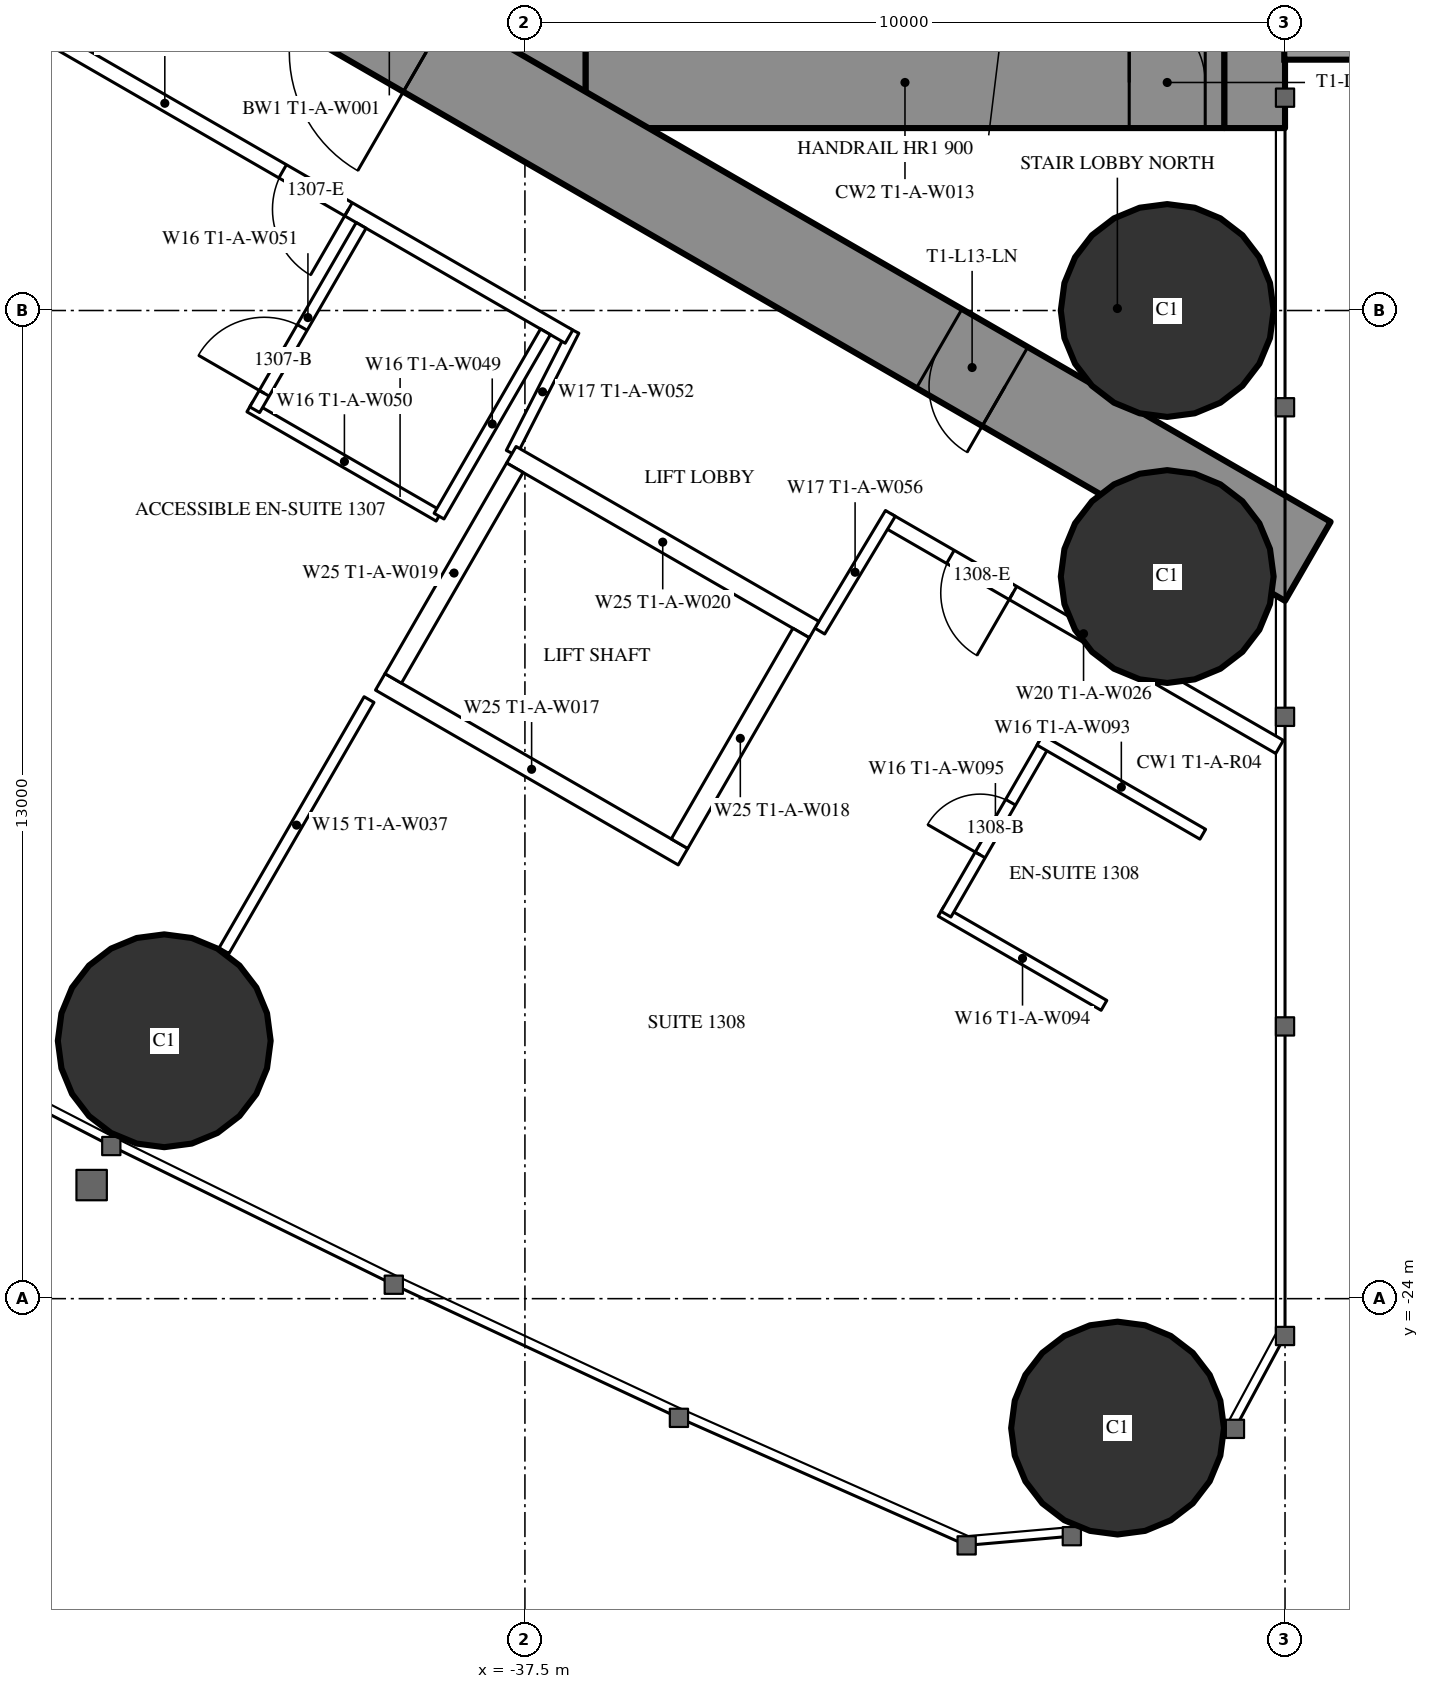
"""IFC4 building model, lengths in metres.
Left out: names, types, materials, properties, quantities, classifications, styles, units other than length and angle.
Written with IfcOpenShell. Run it as: python <this file> out.ifc"""

import sys

from ifc_helpers import new_model, si_unit, direction, frame, frame_2d, origin, origin_2d, place, context, subcontext, project, spatial, rectangle, hollow_circle, extrude, element, fill, save


model = new_model("IFC4")
c1 = context("Model", 3, precision=1e-05, world=origin(), true_north=direction((0.0, 1.0)))
c2 = subcontext(c1, "Body", "Model", "MODEL_VIEW")
j1 = project(units=[si_unit("LENGTHUNIT", "METRE"), si_unit("PLANEANGLEUNIT", "RADIAN")], contexts=[c1])
p1 = place(None, origin())
s1 = spatial("IfcSite", under=j1, at=p1, CompositionType="ELEMENT")
p2 = place(p1, origin())
s2 = spatial("IfcBuilding", under=s1, at=p2, CompositionType="ELEMENT")
p3 = place(p2, frame((0.0, 0.0, 53.0)))
s3 = spatial("IfcBuildingStorey", under=s2, at=p3, CompositionType="ELEMENT", Elevation=53.0)
for number, where, z_axis, x_axis in (
    (1, (-29.703, -25.703, 0.0), (0.0, 0.0, 1.0), (1.0, 0.0, 0.0)),
    (2, (-29.05, -11.0, 0.0), (0.0, 0.0, 1.0), (1.0, 0.0, 0.0)),
    (3, (-29.05, -14.5, 0.0), (0.0, 0.0, 1.0), (1.0, 0.0, 0.0)),
    (4, (-42.245, -20.607, 0.0), (0.0, 0.0, 1.0), (1.0, 0.0, 0.0)),
):
    element("IfcColumn", number, at=place(p3, frame(where, z_axis=z_axis, x_axis=x_axis)), inside=s3, PredefinedType="COLUMN", context=c2, shape_type="SweptSolid", body=[
        extrude(hollow_circle(Radius=1.4, WallThickness=0.12, at=origin_2d()), origin(), (0.0, 0.0, 1.0), 3.5),
    ])
p4 = place(p3, frame((-27.9, 8.6, 0.0), z_axis=(0.0, 0.0, 1.0), x_axis=(0.0, -1.0, 0.0)))
e5 = element("IfcWall", 5, at=p4, inside=s3, PredefinedType="SHEAR", context=c2, shape_type="SweptSolid", body=[
    extrude(rectangle(XDim=17.2, YDim=0.8, at=frame_2d((8.6, 0.0))), origin(), (0.0, 0.0, 1.0), 3.5),
])
p5 = place(p4, frame((2.45, 0.0, 0.6)))
e6 = element("IfcOpeningElement", 6, at=p5, cuts=e5, PredefinedType="OPENING", context=c2, shape_type="SweptSolid", body=[
    extrude(rectangle(XDim=0.6, YDim=2.1, at=frame_2d((0.3, 1.05))), frame((0.0, 0.41, 0.0), z_axis=(0.0, -1.0, 0.0), x_axis=(1.0, 0.0, 0.0)), (0.0, 0.0, 1.0), 0.82),
])
p6 = place(p4, frame((14.15, 0.0, 0.6)))
e7 = element("IfcOpeningElement", 7, at=p6, cuts=e5, PredefinedType="OPENING", context=c2, shape_type="SweptSolid", body=[
    extrude(rectangle(XDim=0.6, YDim=2.1, at=frame_2d((0.3, 1.05))), frame((0.0, 0.41, 0.0), z_axis=(0.0, -1.0, 0.0), x_axis=(1.0, 0.0, 0.0)), (0.0, 0.0, 1.0), 0.82),
])
p7 = place(p3, frame((-37.3, 8.6, 0.0), z_axis=(0.0, 0.0, 1.0), x_axis=(0.0, -1.0, 0.0)))
e8 = element("IfcWall", 8, at=p7, inside=s3, PredefinedType="SHEAR", context=c2, shape_type="SweptSolid", body=[
    extrude(rectangle(XDim=17.2, YDim=1.2, at=frame_2d((8.6, 0.0))), origin(), (0.0, 0.0, 1.0), 3.5),
])
p8 = place(p7, frame((7.7, 0.0, 0.0)))
e9 = element("IfcOpeningElement", 9, at=p8, cuts=e8, PredefinedType="OPENING", context=c2, shape_type="SweptSolid", body=[
    extrude(rectangle(XDim=1.8, YDim=2.2, at=frame_2d((0.9, 1.1))), frame((0.0, 0.61, 0.0), z_axis=(0.0, -1.0, 0.0), x_axis=(1.0, 0.0, 0.0)), (0.0, 0.0, 1.0), 1.22),
])
p9 = place(p3, frame((-28.3, -8.0, 0.0), z_axis=(0.0, 0.0, 1.0), x_axis=(-1.0, 0.0, 0.0)))
e10 = element("IfcWall", 10, at=p9, inside=s3, PredefinedType="SHEAR", context=c2, shape_type="SweptSolid", body=[
    extrude(rectangle(XDim=8.4, YDim=1.2, at=frame_2d((4.2, 0.0))), origin(), (0.0, 0.0, 1.0), 3.5),
])
p10 = place(p9, frame((0.25, 0.0, 0.0)))
e11 = element("IfcOpeningElement", 11, at=p10, cuts=e10, PredefinedType="OPENING", context=c2, shape_type="SweptSolid", body=[
    extrude(rectangle(XDim=1.0, YDim=2.2, at=frame_2d((0.5, 1.1))), frame((0.0, 0.61, 0.0), z_axis=(0.0, -1.0, 0.0), x_axis=(1.0, 0.0, 0.0)), (0.0, 0.0, 1.0), 1.22),
])
p11 = place(p3, frame((-27.2, -14.3, 0.0), z_axis=(0.0, 0.0, 1.0), x_axis=(-0.866024021859, 0.500002393557, 0.0)))
e12 = element("IfcWall", 12, at=p11, inside=s3, PredefinedType="SHEAR", context=c2, shape_type="SweptSolid", body=[
    extrude(rectangle(XDim=27.907, YDim=1.2, at=frame_2d((13.954, 0.0))), origin(), (0.0, 0.0, 1.0), 3.5),
])
p12 = place(p11, frame((4.6, 0.0, 0.0)))
e13 = element("IfcOpeningElement", 13, at=p12, cuts=e12, PredefinedType="OPENING", context=c2, shape_type="SweptSolid", body=[
    extrude(rectangle(XDim=1.0, YDim=2.2, at=frame_2d((0.5, 1.1))), frame((0.0, 0.61, 0.0), z_axis=(0.0, -1.0, 0.0), x_axis=(1.0, 0.0, 0.0)), (0.0, 0.0, 1.0), 1.22),
])
p13 = place(p11, frame((13.395, 0.0, 0.0)))
e14 = element("IfcOpeningElement", 14, at=p13, cuts=e12, PredefinedType="OPENING", context=c2, shape_type="SweptSolid", body=[
    extrude(rectangle(XDim=1.8, YDim=2.2, at=frame_2d((0.9, 1.1))), frame((0.0, 0.61, 0.0), z_axis=(0.0, -1.0, 0.0), x_axis=(1.0, 0.0, 0.0)), (0.0, 0.0, 1.0), 1.22),
])
p14 = place(p3, frame((-39.551, -16.118, 0.0), z_axis=(0.0, 0.0, 1.0), x_axis=(-0.499986503906, -0.866033195618, 0.0)))
e15 = element("IfcWall", 15, at=p14, inside=s3, PredefinedType="PARTITIONING", context=c2, shape_type="SweptSolid", body=[
    extrude(rectangle(XDim=3.815, YDim=0.15, at=frame_2d((1.907, 0.0))), origin(), (0.0, 0.0, 1.0), 3.25),
])
p15 = place(p3, frame((-27.572, -16.741, 0.0), z_axis=(0.0, 0.0, 1.0), x_axis=(-0.866024464444, 0.500001626982, 0.0)))
e16 = element("IfcWall", 16, at=p15, inside=s3, PredefinedType="PARTITIONING", context=c2, shape_type="SweptSolid", body=[
    extrude(rectangle(XDim=5.955, YDim=0.2, at=frame_2d((2.978, 0.0))), origin(), (0.0, 0.0, 1.0), 3.25),
])
p16 = place(p15, frame((4.05, 0.0, 0.0)))
e17 = element("IfcOpeningElement", 17, at=p16, cuts=e16, PredefinedType="OPENING", context=c2, shape_type="SweptSolid", body=[
    extrude(rectangle(XDim=0.95, YDim=2.2, at=frame_2d((0.475, 1.1))), frame((0.0, 0.11, 0.0), z_axis=(0.0, -1.0, 0.0), x_axis=(1.0, 0.0, 0.0)), (0.0, 0.0, 1.0), 0.22),
])
p17 = place(p3, frame((-36.857, -11.265, 0.0), z_axis=(0.0, 0.0, 1.0), x_axis=(-0.454225294761, -0.890886851176, 0.0)))
e18 = element("IfcWall", 18, at=p17, inside=s3, PredefinedType="PARTITIONING", context=c2, shape_type="SweptSolid", body=[
    extrude(rectangle(XDim=1.807, YDim=0.15, at=frame_2d((0.904, 0.0))), origin(), (0.0, 0.0, 1.0), 3.25),
])
p18 = place(p3, frame((-33.621, -15.218, 0.0), z_axis=(0.0, 0.0, 1.0), x_axis=(0.514336634837, 0.857588377991, 0.0)))
e19 = element("IfcWall", 19, at=p18, inside=s3, PredefinedType="PARTITIONING", context=c2, shape_type="SweptSolid", body=[
    extrude(rectangle(XDim=1.805, YDim=0.15, at=frame_2d((0.903, 0.0))), origin(), (0.0, 0.0, 1.0), 3.25),
])
p19 = place(p3, frame((-36.92, -11.344, 0.0), z_axis=(0.0, 0.0, 1.0), x_axis=(-0.866025017052, 0.500000669839, 0.0)))
e20 = element("IfcWall", 20, at=p19, inside=s3, PredefinedType="PARTITIONING", context=c2, shape_type="SweptSolid", body=[
    extrude(rectangle(XDim=12.28, YDim=0.2, at=frame_2d((6.14, 0.0))), origin(), (0.0, 0.0, 1.0), 3.25),
])
p20 = place(p19, frame((3.35, 0.0, 0.0)))
e21 = element("IfcOpeningElement", 21, at=p20, cuts=e20, PredefinedType="OPENING", context=c2, shape_type="SweptSolid", body=[
    extrude(rectangle(XDim=1.0, YDim=2.2, at=frame_2d((0.5, 1.1))), frame((0.0, 0.11, 0.0), z_axis=(0.0, -1.0, 0.0), x_axis=(1.0, 0.0, 0.0)), (0.0, 0.0, 1.0), 0.22),
])
p21 = place(p3, frame((-38.63, -13.705, 0.0), z_axis=(0.0, 0.0, 1.0), x_axis=(-0.866018712932, 0.500011588718, 0.0)))
e22 = element("IfcWall", 22, at=p21, inside=s3, PredefinedType="PARTITIONING", context=c2, shape_type="SweptSolid", body=[
    extrude(rectangle(XDim=2.875, YDim=0.15, at=frame_2d((1.438, 0.0))), origin(), (0.0, 0.0, 1.0), 3.25),
])
p22 = place(p3, frame((-39.655, -9.88, 0.0), z_axis=(0.0, 0.0, 1.0), x_axis=(-0.500049511043, -0.865996816683, 0.0)))
e23 = element("IfcWall", 23, at=p22, inside=s3, PredefinedType="PARTITIONING", context=c2, shape_type="SweptSolid", body=[
    extrude(rectangle(XDim=2.8, YDim=0.15, at=frame_2d((1.4, 0.0))), origin(), (0.0, 0.0, 1.0), 3.25),
])
p23 = place(p22, frame((1.55, 0.0, 0.0)))
e24 = element("IfcOpeningElement", 24, at=p23, cuts=e23, PredefinedType="OPENING", context=c2, shape_type="SweptSolid", body=[
    extrude(rectangle(XDim=1.0, YDim=2.2, at=frame_2d((0.5, 1.1))), frame((0.0, 0.085, 0.0), z_axis=(0.0, -1.0, 0.0), x_axis=(1.0, 0.0, 0.0)), (0.0, 0.0, 1.0), 0.17),
])
p24 = place(p3, frame((-37.23, -11.281, 0.0), z_axis=(0.0, 0.0, 1.0), x_axis=(-0.500049511043, -0.865996816683, 0.0)))
e25 = element("IfcWall", 25, at=p24, inside=s3, PredefinedType="PARTITIONING", context=c2, shape_type="SweptSolid", body=[
    extrude(rectangle(XDim=2.8, YDim=0.15, at=frame_2d((1.4, 0.0))), origin(), (0.0, 0.0, 1.0), 3.25),
])
p25 = place(p3, frame((-29.882, -20.142, 0.0), z_axis=(0.0, 0.0, 1.0), x_axis=(-0.866031185235, 0.4999899861, 0.0)))
e26 = element("IfcWall", 26, at=p25, inside=s3, PredefinedType="PARTITIONING", context=c2, shape_type="SweptSolid", body=[
    extrude(rectangle(XDim=2.475, YDim=0.15, at=frame_2d((1.238, 0.0))), origin(), (0.0, 0.0, 1.0), 3.25),
])
p26 = place(p3, frame((-30.66, -16.69, 0.0), z_axis=(0.0, 0.0, 1.0), x_axis=(-0.499936506574, -0.866062058628, 0.0)))
e27 = element("IfcWall", 27, at=p26, inside=s3, PredefinedType="PARTITIONING", context=c2, shape_type="SweptSolid", body=[
    extrude(rectangle(XDim=2.6, YDim=0.15, at=frame_2d((1.3, 0.0))), origin(), (0.0, 0.0, 1.0), 3.25),
])
p27 = place(p26, frame((0.9, 0.0, 0.0)))
e28 = element("IfcOpeningElement", 28, at=p27, cuts=e27, PredefinedType="OPENING", context=c2, shape_type="SweptSolid", body=[
    extrude(rectangle(XDim=0.8, YDim=2.2, at=frame_2d((0.4, 1.1))), frame((0.0, 0.085, 0.0), z_axis=(0.0, -1.0, 0.0), x_axis=(1.0, 0.0, 0.0)), (0.0, 0.0, 1.0), 0.17),
])
p28 = place(p3, frame((-28.582, -17.89, 0.0), z_axis=(0.0, 0.0, 1.0), x_axis=(-0.866073894602, 0.499916002032, 0.0)))
e29 = element("IfcWall", 29, at=p28, inside=s3, PredefinedType="PARTITIONING", context=c2, shape_type="SweptSolid", body=[
    extrude(rectangle(XDim=2.475, YDim=0.15, at=frame_2d((1.238, 0.0))), origin(), (0.0, 0.0, 1.0), 3.25),
])
p29 = place(p3, frame((-33.696, -15.197, 0.0), z_axis=(0.0, 0.0, 1.0), x_axis=(-0.865976953817, 0.500083908417, 0.0)))
e30 = element("IfcWall", 30, at=p29, inside=s3, PredefinedType="PARTITIONING", context=c2, shape_type="SweptSolid", body=[
    extrude(rectangle(XDim=4.599, YDim=0.25, at=frame_2d((2.3, 0.0))), origin(), (0.0, 0.0, 1.0), 3.25),
])
p30 = place(p3, frame((-35.42, -18.186, 0.0), z_axis=(0.0, 0.0, 1.0), x_axis=(-0.865990227814, 0.50006092162, 0.0)))
e31 = element("IfcWall", 31, at=p30, inside=s3, PredefinedType="PARTITIONING", context=c2, shape_type="SweptSolid", body=[
    extrude(rectangle(XDim=4.6, YDim=0.25, at=frame_2d((2.3, 0.0))), origin(), (0.0, 0.0, 1.0), 3.25),
])
p31 = place(p3, frame((-33.866, -15.243, 0.0), z_axis=(0.0, 0.0, 1.0), x_axis=(-0.499929347863, -0.866066190972, 0.0)))
e32 = element("IfcWall", 32, at=p31, inside=s3, PredefinedType="PARTITIONING", context=c2, shape_type="SweptSolid", body=[
    extrude(rectangle(XDim=3.201, YDim=0.25, at=frame_2d((1.6, 0.0))), origin(), (0.0, 0.0, 1.0), 3.25),
])
p32 = place(p3, frame((-37.633, -13.068, 0.0), z_axis=(0.0, 0.0, 1.0), x_axis=(-0.499872130319, -0.866099216793, 0.0)))
e33 = element("IfcWall", 33, at=p32, inside=s3, PredefinedType="PARTITIONING", context=c2, shape_type="SweptSolid", body=[
    extrude(rectangle(XDim=3.2, YDim=0.25, at=frame_2d((1.6, 0.0))), origin(), (0.0, 0.0, 1.0), 3.25),
])
p33 = place(p23, origin())
e34 = element("IfcDoor", 34, at=p33, inside=s3, OperationType="SINGLE_SWING_RIGHT", PredefinedType="DOOR", context=c2, shape_type="SweptSolid", body=[
    extrude(rectangle(XDim=1.0, YDim=2.2, at=frame_2d((0.5, 1.1))), frame((0.0, 0.025, 0.0), z_axis=(0.0, -1.0, 0.0), x_axis=(1.0, 0.0, 0.0)), (0.0, 0.0, 1.0), 0.05),
])
fill(e24, e34)
p34 = place(p20, origin())
e35 = element("IfcDoor", 35, at=p34, inside=s3, OperationType="SINGLE_SWING_LEFT", PredefinedType="DOOR", context=c2, shape_type="SweptSolid", body=[
    extrude(rectangle(XDim=1.0, YDim=2.2, at=frame_2d((0.5, 1.1))), frame((0.0, 0.025, 0.0), z_axis=(0.0, -1.0, 0.0), x_axis=(1.0, 0.0, 0.0)), (0.0, 0.0, 1.0), 0.05),
])
fill(e21, e35)
p35 = place(p27, origin())
e36 = element("IfcDoor", 36, at=p35, inside=s3, OperationType="SINGLE_SWING_RIGHT", PredefinedType="DOOR", context=c2, shape_type="SweptSolid", body=[
    extrude(rectangle(XDim=0.8, YDim=2.2, at=frame_2d((0.4, 1.1))), frame((0.0, 0.025, 0.0), z_axis=(0.0, -1.0, 0.0), x_axis=(1.0, 0.0, 0.0)), (0.0, 0.0, 1.0), 0.05),
])
fill(e28, e36)
p36 = place(p16, origin())
e37 = element("IfcDoor", 37, at=p36, inside=s3, OperationType="SINGLE_SWING_LEFT", PredefinedType="DOOR", context=c2, shape_type="SweptSolid", body=[
    extrude(rectangle(XDim=0.95, YDim=2.2, at=frame_2d((0.475, 1.1))), frame((0.0, 0.025, 0.0), z_axis=(0.0, -1.0, 0.0), x_axis=(1.0, 0.0, 0.0)), (0.0, 0.0, 1.0), 0.05),
])
fill(e17, e37)
p37 = place(p12, origin())
e38 = element("IfcDoor", 38, at=p37, inside=s3, OperationType="SINGLE_SWING_LEFT", PredefinedType="DOOR", context=c2, shape_type="SweptSolid", body=[
    extrude(rectangle(XDim=1.0, YDim=2.2, at=frame_2d((0.5, 1.1))), frame((0.0, 0.025, 0.0), z_axis=(0.0, -1.0, 0.0), x_axis=(1.0, 0.0, 0.0)), (0.0, 0.0, 1.0), 0.05),
])
fill(e13, e38)
p38 = place(p13, origin())
e39 = element("IfcDoor", 39, at=p38, inside=s3, OperationType="DOUBLE_DOOR_SINGLE_SWING", PredefinedType="DOOR", context=c2, shape_type="SweptSolid", body=[
    extrude(rectangle(XDim=1.8, YDim=2.2, at=frame_2d((0.9, 1.1))), frame((0.0, 0.025, 0.0), z_axis=(0.0, -1.0, 0.0), x_axis=(1.0, 0.0, 0.0)), (0.0, 0.0, 1.0), 0.05),
])
fill(e14, e39)
p39 = place(p10, origin())
e40 = element("IfcDoor", 40, at=p39, inside=s3, OperationType="SINGLE_SWING_RIGHT", PredefinedType="DOOR", context=c2, shape_type="SweptSolid", body=[
    extrude(rectangle(XDim=1.0, YDim=2.2, at=frame_2d((0.5, 1.1))), frame((0.0, 0.025, 0.0), z_axis=(0.0, -1.0, 0.0), x_axis=(1.0, 0.0, 0.0)), (0.0, 0.0, 1.0), 0.05),
])
fill(e11, e40)
save(model, sys.argv[1])
